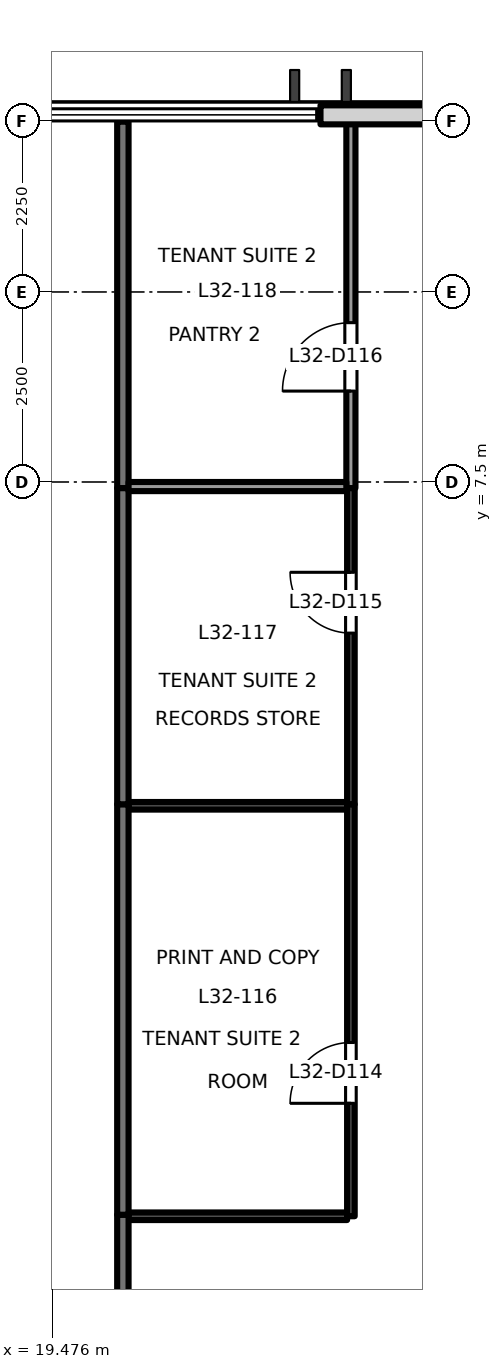
"""IFC4 building model, lengths in metres.
Left out: names, types, materials, properties, quantities, classifications, styles, units other than length and angle.
Written with IfcOpenShell. Run it as: python <this file> out.ifc"""

import sys

from ifc_helpers import new_model, si_unit, direction, frame, frame_2d, origin, place, context, subcontext, project, spatial, rectangle, extrude, element, fill, save


model = new_model("IFC4")
c1 = context("Model", 3, precision=1e-05, world=origin(), true_north=direction((0.0, 1.0)))
c2 = subcontext(c1, "Body", "Model", "MODEL_VIEW")
j1 = project(units=[si_unit("LENGTHUNIT", "METRE"), si_unit("PLANEANGLEUNIT", "RADIAN")], contexts=[c1])
p1 = place(None, origin())
s1 = spatial("IfcSite", under=j1, at=p1, CompositionType="ELEMENT")
p2 = place(p1, origin())
s2 = spatial("IfcBuilding", under=s1, at=p2, CompositionType="ELEMENT")
p3 = place(p2, frame((0.0, 0.0, 142.1)))
s3 = spatial("IfcBuildingStorey", under=s2, at=p3, CompositionType="ELEMENT", Elevation=142.1)
p4 = place(p3, frame((25.955, 12.33, 0.0), z_axis=(0.0, 0.0, 1.0), x_axis=(-1.0, 0.0, 0.0)))
e1 = element("IfcWall", 1, at=p4, inside=s3, PredefinedType="SOLIDWALL", context=c2, shape_type="SweptSolid", body=[
    extrude(rectangle(XDim=2.955, YDim=0.25, at=frame_2d((1.478, 0.0))), origin(), (0.0, 0.0, 1.0), 3.8),
])
p5 = place(p3, frame((20.4, -2.14, 0.0), z_axis=(0.0, 0.0, 1.0), x_axis=(0.0, -1.0, 0.0)))
e2 = element("IfcWall", 2, at=p5, inside=s3, PredefinedType="PARTITIONING", context=c2, shape_type="SweptSolid", body=[
    extrude(rectangle(XDim=6.04, YDim=0.15, at=frame_2d((3.02, 0.0))), origin(), (0.0, 0.0, 1.0), 3.3),
])
p6 = place(p5, frame((3.055, 0.0, 0.0)))
e3 = element("IfcOpeningElement", 3, at=p6, cuts=e2, PredefinedType="OPENING", context=c2, shape_type="SweptSolid", body=[
    extrude(rectangle(XDim=1.8, YDim=2.1, at=frame_2d((0.9, 1.05))), frame((0.0, 0.085, 0.0), z_axis=(0.0, -1.0, 0.0), x_axis=(1.0, 0.0, 0.0)), (0.0, 0.0, 1.0), 0.171),
])
p7 = place(p3, frame((20.4, 3.26, 0.0), z_axis=(0.0, 0.0, 1.0), x_axis=(0.0, -1.0, 0.0)))
e4 = element("IfcWall", 4, at=p7, inside=s3, PredefinedType="PARTITIONING", context=c2, shape_type="SweptSolid", body=[
    extrude(rectangle(XDim=5.4, YDim=0.15, at=frame_2d((2.7, 0.0))), origin(), (0.0, 0.0, 1.0), 3.3),
])
p8 = place(p3, frame((20.4, 7.42, 0.0), z_axis=(0.0, 0.0, 1.0), x_axis=(0.0, -1.0, 0.0)))
e5 = element("IfcWall", 5, at=p8, inside=s3, PredefinedType="PARTITIONING", context=c2, shape_type="SweptSolid", body=[
    extrude(rectangle(XDim=4.16, YDim=0.15, at=frame_2d((2.08, 0.0))), origin(), (0.0, 0.0, 1.0), 3.3),
])
p9 = place(p3, frame((20.4, 12.24, 0.0), z_axis=(0.0, 0.0, 1.0), x_axis=(0.0, -1.0, 0.0)))
e6 = element("IfcWall", 6, at=p9, inside=s3, PredefinedType="PARTITIONING", context=c2, shape_type="SweptSolid", body=[
    extrude(rectangle(XDim=4.82, YDim=0.15, at=frame_2d((2.41, 0.0))), origin(), (0.0, 0.0, 1.0), 3.8),
])
p10 = place(p3, frame((20.475, -2.16, 0.0), z_axis=(0.0, 0.0, 1.0), x_axis=(1.0, 0.0, 0.0)))
e7 = element("IfcWall", 7, at=p10, inside=s3, PredefinedType="PARTITIONING", context=c2, shape_type="SweptSolid", body=[
    extrude(rectangle(XDim=2.875, YDim=0.1, at=frame_2d((1.438, 0.0))), origin(), (0.0, 0.0, 1.0), 3.8),
])
p11 = place(p3, frame((23.4, -2.16, 0.0), z_axis=(0.0, 0.0, 1.0), x_axis=(0.0, 1.0, 0.0)))
e8 = element("IfcWall", 8, at=p11, inside=s3, PredefinedType="PARTITIONING", context=c2, shape_type="SweptSolid", body=[
    extrude(rectangle(XDim=5.42, YDim=0.1, at=frame_2d((2.71, 0.0))), origin(), (0.0, 0.0, 1.0), 3.3),
])
p12 = place(p11, frame((1.486, 0.0, 0.0)))
e9 = element("IfcOpeningElement", 9, at=p12, cuts=e8, PredefinedType="OPENING", context=c2, shape_type="SweptSolid", body=[
    extrude(rectangle(XDim=0.8, YDim=2.1, at=frame_2d((0.4, 1.05))), frame((0.0, 0.061, 0.0), z_axis=(0.0, -1.0, 0.0), x_axis=(1.0, 0.0, 0.0)), (0.0, 0.0, 1.0), 0.121),
])
p13 = place(p3, frame((23.4, 3.26, 0.0), z_axis=(0.0, 0.0, 1.0), x_axis=(0.0, 1.0, 0.0)))
e10 = element("IfcWall", 10, at=p13, inside=s3, PredefinedType="PARTITIONING", context=c2, shape_type="SweptSolid", body=[
    extrude(rectangle(XDim=4.16, YDim=0.1, at=frame_2d((2.08, 0.0))), origin(), (0.0, 0.0, 1.0), 3.3),
])
p14 = place(p13, frame((2.252, 0.0, 0.0)))
e11 = element("IfcOpeningElement", 11, at=p14, cuts=e10, PredefinedType="OPENING", context=c2, shape_type="SweptSolid", body=[
    extrude(rectangle(XDim=0.8, YDim=2.1, at=frame_2d((0.4, 1.05))), frame((0.0, 0.061, 0.0), z_axis=(0.0, -1.0, 0.0), x_axis=(1.0, 0.0, 0.0)), (0.0, 0.0, 1.0), 0.121),
])
p15 = place(p3, frame((23.4, 7.42, 0.0), z_axis=(0.0, 0.0, 1.0), x_axis=(0.0, 1.0, 0.0)))
e12 = element("IfcWall", 12, at=p15, inside=s3, PredefinedType="PARTITIONING", context=c2, shape_type="SweptSolid", body=[
    extrude(rectangle(XDim=4.82, YDim=0.12, at=frame_2d((2.41, 0.0))), origin(), (0.0, 0.0, 1.0), 3.8),
])
p16 = place(p15, frame((1.276, 0.0, 0.0)))
e13 = element("IfcOpeningElement", 13, at=p16, cuts=e12, PredefinedType="OPENING", context=c2, shape_type="SweptSolid", body=[
    extrude(rectangle(XDim=0.9, YDim=2.1, at=frame_2d((0.45, 1.05))), frame((0.0, 0.071, 0.0), z_axis=(0.0, -1.0, 0.0), x_axis=(1.0, 0.0, 0.0)), (0.0, 0.0, 1.0), 0.141),
])
p17 = place(p3, frame((20.475, 3.24, 0.0), z_axis=(0.0, 0.0, 1.0), x_axis=(1.0, 0.0, 0.0)))
e14 = element("IfcWall", 14, at=p17, inside=s3, PredefinedType="PARTITIONING", context=c2, shape_type="SweptSolid", body=[
    extrude(rectangle(XDim=2.875, YDim=0.1, at=frame_2d((1.438, 0.0))), origin(), (0.0, 0.0, 1.0), 3.8),
])
p18 = place(p3, frame((20.475, 7.44, 0.0), z_axis=(0.0, 0.0, 1.0), x_axis=(1.0, 0.0, 0.0)))
e15 = element("IfcWall", 15, at=p18, inside=s3, PredefinedType="PARTITIONING", context=c2, shape_type="SweptSolid", body=[
    extrude(rectangle(XDim=2.865, YDim=0.12, at=frame_2d((1.433, 0.0))), origin(), (0.0, 0.0, 1.0), 3.8),
])
p19 = place(p12, origin())
e16 = element("IfcDoor", 16, at=p19, inside=s3, OperationType="SINGLE_SWING_LEFT", PredefinedType="DOOR", context=c2, shape_type="SweptSolid", body=[
    extrude(rectangle(XDim=0.8, YDim=2.1, at=frame_2d((0.4, 1.05))), frame((0.0, 0.025, 0.0), z_axis=(0.0, -1.0, 0.0), x_axis=(1.0, 0.0, 0.0)), (0.0, 0.0, 1.0), 0.05),
])
fill(e9, e16)
p20 = place(p14, origin())
e17 = element("IfcDoor", 17, at=p20, inside=s3, OperationType="SINGLE_SWING_RIGHT", PredefinedType="DOOR", context=c2, shape_type="SweptSolid", body=[
    extrude(rectangle(XDim=0.8, YDim=2.1, at=frame_2d((0.4, 1.05))), frame((0.0, 0.025, 0.0), z_axis=(0.0, -1.0, 0.0), x_axis=(1.0, 0.0, 0.0)), (0.0, 0.0, 1.0), 0.05),
])
fill(e11, e17)
p21 = place(p16, origin())
e18 = element("IfcDoor", 18, at=p21, inside=s3, OperationType="SINGLE_SWING_LEFT", PredefinedType="DOOR", context=c2, shape_type="SweptSolid", body=[
    extrude(rectangle(XDim=0.9, YDim=2.1, at=frame_2d((0.45, 1.05))), frame((0.0, 0.025, 0.0), z_axis=(0.0, -1.0, 0.0), x_axis=(1.0, 0.0, 0.0)), (0.0, 0.0, 1.0), 0.05),
])
fill(e13, e18)
save(model, sys.argv[1])
